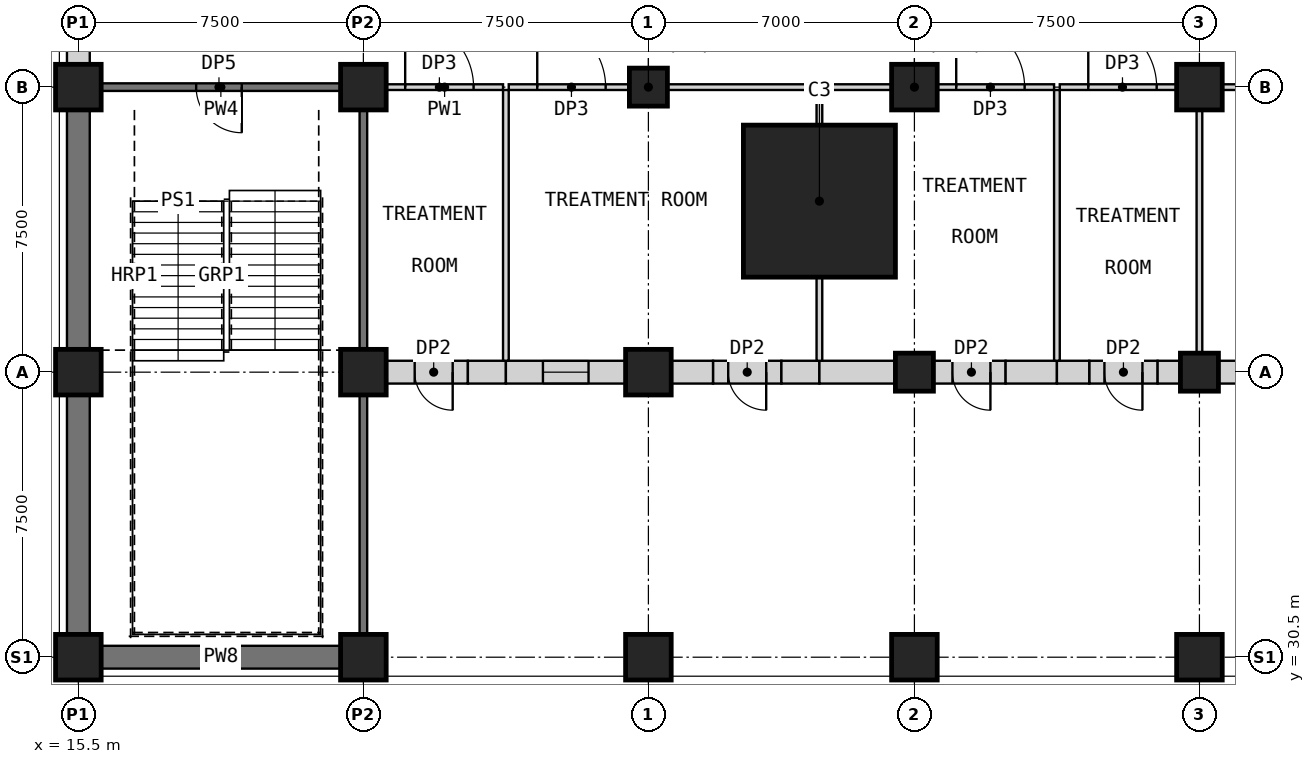
"""IFC4 building model, lengths in metres.
Left out: names, types, materials, properties, quantities, classifications, styles, units other than length and angle.
Written with IfcOpenShell. Run it as: python <this file> out.ifc"""

import sys

from ifc_helpers import new_model, si_unit, direction, frame, frame_2d, origin, origin_2d, place, context, subcontext, project, spatial, rectangle, extrude, element, fill, save


model = new_model("IFC4")
c1 = context("Model", 3, precision=1e-05, world=origin(), true_north=direction((0.0, 1.0)))
c2 = subcontext(c1, "Body", "Model", "MODEL_VIEW")
j1 = project(units=[si_unit("LENGTHUNIT", "METRE"), si_unit("PLANEANGLEUNIT", "RADIAN")], contexts=[c1])
p1 = place(None, origin())
s1 = spatial("IfcSite", under=j1, at=p1, CompositionType="ELEMENT")
p2 = place(p1, origin())
s2 = spatial("IfcBuilding", under=s1, at=p2, CompositionType="ELEMENT")
p3 = place(p2, frame((0.0, 0.0, 29.0)))
s3 = spatial("IfcBuildingStorey", under=s2, at=p3, CompositionType="ELEMENT", Elevation=29.0)
for number, where, z_axis, x_axis in (
    (1, (30.5, 45.5, 0.0), (0.0, 0.0, 1.0), (1.0, 0.0, 0.0)),
    (2, (37.5, 38.0, 0.0), (0.0, 0.0, 1.0), (1.0, 0.0, 0.0)),
):
    element("IfcColumn", number, at=place(p3, frame(where, z_axis=z_axis, x_axis=x_axis)), inside=s3, PredefinedType="COLUMN", context=c2, shape_type="SweptSolid", body=[
        extrude(rectangle(XDim=1.0, YDim=1.0, at=origin_2d()), origin(), (0.0, 0.0, 1.0), 5.0),
    ])
p4 = place(p3, frame((37.5, 45.5, 0.0), z_axis=(0.0, 0.0, 1.0), x_axis=(1.0, 0.0, 0.0)))
e3 = element("IfcColumn", 3, at=p4, inside=s3, PredefinedType="COLUMN", context=c2, shape_type="SweptSolid", body=[
    extrude(rectangle(XDim=1.2, YDim=1.2, at=origin_2d()), origin(), (0.0, 0.0, 1.0), 5.0),
])
p5 = place(p3, frame((45.0, 38.0, 0.0), z_axis=(0.0, 0.0, 1.0), x_axis=(1.0, 0.0, 0.0)))
e4 = element("IfcColumn", 4, at=p5, inside=s3, PredefinedType="COLUMN", context=c2, shape_type="SweptSolid", body=[
    extrude(rectangle(XDim=1.0, YDim=1.0, at=origin_2d()), origin(), (0.0, 0.0, 1.0), 5.0),
])
p6 = place(p3, frame((45.0, 45.5, 0.0), z_axis=(0.0, 0.0, 1.0), x_axis=(1.0, 0.0, 0.0)))
e5 = element("IfcColumn", 5, at=p6, inside=s3, PredefinedType="COLUMN", context=c2, shape_type="SweptSolid", body=[
    extrude(rectangle(XDim=1.2, YDim=1.2, at=origin_2d()), origin(), (0.0, 0.0, 1.0), 5.0),
])
p7 = place(p3, frame((35.0, 42.5, 0.0), z_axis=(0.0, 0.0, 1.0), x_axis=(1.0, 0.0, 0.0)))
e6 = element("IfcColumn", 6, at=p7, inside=s3, PredefinedType="COLUMN", context=c2, shape_type="SweptSolid", body=[
    extrude(rectangle(XDim=4.0, YDim=4.0, at=origin_2d()), origin(), (0.0, 0.0, 1.0), 5.0),
])
for number, where, z_axis, x_axis in (
    (7, (15.5, 30.5, 0.0), (0.0, 0.0, 1.0), (1.0, 0.0, 0.0)),
    (8, (15.5, 38.0, 0.0), (0.0, 0.0, 1.0), (1.0, 0.0, 0.0)),
    (9, (15.5, 45.5, 0.0), (0.0, 0.0, 1.0), (1.0, 0.0, 0.0)),
    (10, (23.0, 30.5, 0.0), (0.0, 0.0, 1.0), (1.0, 0.0, 0.0)),
    (11, (23.0, 38.0, 0.0), (0.0, 0.0, 1.0), (1.0, 0.0, 0.0)),
    (12, (23.0, 45.5, 0.0), (0.0, 0.0, 1.0), (1.0, 0.0, 0.0)),
    (13, (30.5, 30.5, 0.0), (0.0, 0.0, 1.0), (1.0, 0.0, 0.0)),
    (14, (30.5, 38.0, 0.0), (0.0, 0.0, 1.0), (1.0, 0.0, 0.0)),
    (15, (37.5, 30.5, 0.0), (0.0, 0.0, 1.0), (1.0, 0.0, 0.0)),
    (16, (45.0, 30.5, 0.0), (0.0, 0.0, 1.0), (1.0, 0.0, 0.0)),
):
    element("IfcColumn", number, at=place(p3, frame(where, z_axis=z_axis, x_axis=x_axis)), inside=s3, PredefinedType="COLUMN", context=c2, shape_type="SweptSolid", body=[
        extrude(rectangle(XDim=1.2, YDim=1.2, at=origin_2d()), origin(), (0.0, 0.0, 1.0), 5.0),
    ])
p8 = place(p3, frame((16.1, 30.5, 0.0), z_axis=(0.0, 0.0, 1.0), x_axis=(1.0, 0.0, 0.0)))
e17 = element("IfcWall", 17, at=p8, inside=s3, PredefinedType="PARTITIONING", context=c2, shape_type="SweptSolid", body=[
    extrude(rectangle(XDim=6.3, YDim=0.6, at=frame_2d((3.15, 0.0))), origin(), (0.0, 0.0, 1.0), 4.7),
])
p9 = place(p3, frame((22.4, 45.5, 0.0), z_axis=(0.0, 0.0, 1.0), x_axis=(-1.0, 0.0, 0.0)))
e18 = element("IfcWall", 18, at=p9, inside=s3, PredefinedType="SHEAR", context=c2, shape_type="SweptSolid", body=[
    extrude(rectangle(XDim=6.3, YDim=0.2, at=frame_2d((3.15, 0.0))), origin(), (0.0, 0.0, 1.0), 4.7),
])
p10 = place(p9, frame((2.6, 0.0, 0.0)))
e19 = element("IfcOpeningElement", 19, at=p10, cuts=e18, PredefinedType="OPENING", context=c2, shape_type="SweptSolid", body=[
    extrude(rectangle(XDim=1.2, YDim=2.1, at=frame_2d((0.6, 1.05))), frame((0.0, 0.11, 0.0), z_axis=(0.0, -1.0, 0.0), x_axis=(1.0, 0.0, 0.0)), (0.0, 0.0, 1.0), 0.22),
])
p11 = place(p3, frame((23.6, 45.5, 0.0), z_axis=(0.0, 0.0, 1.0), x_axis=(1.0, 0.0, 0.0)))
e20 = element("IfcWall", 20, at=p11, inside=s3, PredefinedType="PARTITIONING", context=c2, shape_type="SweptSolid", body=[
    extrude(rectangle(XDim=3.075, YDim=0.15, at=frame_2d((1.538, 0.0))), origin(), (0.0, 0.0, 1.0), 4.7),
])
p12 = place(p11, frame((0.5, 0.0, 0.0)))
e21 = element("IfcOpeningElement", 21, at=p12, cuts=e20, PredefinedType="OPENING", context=c2, shape_type="SweptSolid", body=[
    extrude(rectangle(XDim=1.8, YDim=2.4, at=frame_2d((0.9, 1.2))), frame((0.0, 0.085, 0.0), z_axis=(0.0, -1.0, 0.0), x_axis=(1.0, 0.0, 0.0)), (0.0, 0.0, 1.0), 0.17),
])
p13 = place(p3, frame((26.825, 45.5, 0.0), z_axis=(0.0, 0.0, 1.0), x_axis=(1.0, 0.0, 0.0)))
e22 = element("IfcWall", 22, at=p13, inside=s3, PredefinedType="PARTITIONING", context=c2, shape_type="SweptSolid", body=[
    extrude(rectangle(XDim=3.175, YDim=0.15, at=frame_2d((1.587, 0.0))), origin(), (0.0, 0.0, 1.0), 4.7),
])
p14 = place(p13, frame((0.75, 0.0, 0.0)))
e23 = element("IfcOpeningElement", 23, at=p14, cuts=e22, PredefinedType="OPENING", context=c2, shape_type="SweptSolid", body=[
    extrude(rectangle(XDim=1.8, YDim=2.4, at=frame_2d((0.9, 1.2))), frame((0.0, 0.085, 0.0), z_axis=(0.0, -1.0, 0.0), x_axis=(1.0, 0.0, 0.0)), (0.0, 0.0, 1.0), 0.17),
])
p15 = place(p3, frame((31.0, 45.5, 0.0), z_axis=(0.0, 0.0, 1.0), x_axis=(1.0, 0.0, 0.0)))
e24 = element("IfcWall", 24, at=p15, inside=s3, PredefinedType="PARTITIONING", context=c2, shape_type="SweptSolid", body=[
    extrude(rectangle(XDim=3.925, YDim=0.15, at=frame_2d((1.962, 0.0))), origin(), (0.0, 0.0, 1.0), 4.7),
])
p16 = place(p3, frame((35.075, 45.5, 0.0), z_axis=(0.0, 0.0, 1.0), x_axis=(1.0, 0.0, 0.0)))
e25 = element("IfcWall", 25, at=p16, inside=s3, PredefinedType="PARTITIONING", context=c2, shape_type="SweptSolid", body=[
    extrude(rectangle(XDim=1.825, YDim=0.15, at=frame_2d((0.913, 0.0))), origin(), (0.0, 0.0, 1.0), 4.7),
])
p17 = place(p3, frame((38.1, 45.5, 0.0), z_axis=(0.0, 0.0, 1.0), x_axis=(1.0, 0.0, 0.0)))
e26 = element("IfcWall", 26, at=p17, inside=s3, PredefinedType="PARTITIONING", context=c2, shape_type="SweptSolid", body=[
    extrude(rectangle(XDim=3.075, YDim=0.15, at=frame_2d((1.538, 0.0))), origin(), (0.0, 0.0, 1.0), 4.7),
])
p18 = place(p17, frame((0.5, 0.0, 0.0)))
e27 = element("IfcOpeningElement", 27, at=p18, cuts=e26, PredefinedType="OPENING", context=c2, shape_type="SweptSolid", body=[
    extrude(rectangle(XDim=1.8, YDim=2.4, at=frame_2d((0.9, 1.2))), frame((0.0, 0.085, 0.0), z_axis=(0.0, -1.0, 0.0), x_axis=(1.0, 0.0, 0.0)), (0.0, 0.0, 1.0), 0.17),
])
p19 = place(p3, frame((41.325, 45.5, 0.0), z_axis=(0.0, 0.0, 1.0), x_axis=(1.0, 0.0, 0.0)))
e28 = element("IfcWall", 28, at=p19, inside=s3, PredefinedType="PARTITIONING", context=c2, shape_type="SweptSolid", body=[
    extrude(rectangle(XDim=3.075, YDim=0.15, at=frame_2d((1.538, 0.0))), origin(), (0.0, 0.0, 1.0), 4.7),
])
p20 = place(p19, frame((0.75, 0.0, 0.0)))
e29 = element("IfcOpeningElement", 29, at=p20, cuts=e28, PredefinedType="OPENING", context=c2, shape_type="SweptSolid", body=[
    extrude(rectangle(XDim=1.8, YDim=2.4, at=frame_2d((0.9, 1.2))), frame((0.0, 0.085, 0.0), z_axis=(0.0, -1.0, 0.0), x_axis=(1.0, 0.0, 0.0)), (0.0, 0.0, 1.0), 0.17),
])
p21 = place(p3, frame((45.6, 45.5, 0.0), z_axis=(0.0, 0.0, 1.0), x_axis=(1.0, 0.0, 0.0)))
e30 = element("IfcWall", 30, at=p21, inside=s3, PredefinedType="PARTITIONING", context=c2, shape_type="SweptSolid", body=[
    extrude(rectangle(XDim=6.3, YDim=0.15, at=frame_2d((3.15, 0.0))), origin(), (0.0, 0.0, 1.0), 4.7),
])
p22 = place(p21, frame((2.25, 0.0, 0.0)))
e31 = element("IfcOpeningElement", 31, at=p22, cuts=e30, PredefinedType="OPENING", context=c2, shape_type="SweptSolid", body=[
    extrude(rectangle(XDim=1.8, YDim=2.4, at=frame_2d((0.9, 1.2))), frame((0.0, 0.085, 0.0), z_axis=(0.0, -1.0, 0.0), x_axis=(1.0, 0.0, 0.0)), (0.0, 0.0, 1.0), 0.17),
])
p23 = place(p3, frame((25.75, 38.0, 0.0), z_axis=(0.0, 0.0, 1.0), x_axis=(-1.0, 0.0, 0.0)))
e32 = element("IfcWall", 32, at=p23, inside=s3, PredefinedType="PARTITIONING", context=c2, shape_type="SweptSolid", body=[
    extrude(rectangle(XDim=2.15, YDim=0.6, at=frame_2d((1.075, 0.0))), origin(), (0.0, 0.0, 1.0), 4.7),
])
p24 = place(p23, frame((0.4, 0.0, 0.0)))
e33 = element("IfcOpeningElement", 33, at=p24, cuts=e32, PredefinedType="OPENING", context=c2, shape_type="SweptSolid", body=[
    extrude(rectangle(XDim=1.0, YDim=2.1, at=frame_2d((0.5, 1.05))), frame((0.0, 0.31, 0.0), z_axis=(0.0, -1.0, 0.0), x_axis=(1.0, 0.0, 0.0)), (0.0, 0.0, 1.0), 0.62),
])
p25 = place(p3, frame((25.75, 38.0, 0.0), z_axis=(0.0, 0.0, 1.0), x_axis=(1.0, 0.0, 0.0)))
e34 = element("IfcWall", 34, at=p25, inside=s3, PredefinedType="PARTITIONING", context=c2, shape_type="SweptSolid", body=[
    extrude(rectangle(XDim=1.0, YDim=0.6, at=frame_2d((0.5, 0.0))), origin(), (0.0, 0.0, 1.0), 4.7),
])
p26 = place(p3, frame((26.75, 38.0, 0.0), z_axis=(0.0, 0.0, 1.0), x_axis=(1.0, 0.0, 0.0)))
e35 = element("IfcWall", 35, at=p26, inside=s3, PredefinedType="PARTITIONING", context=c2, shape_type="SweptSolid", body=[
    extrude(rectangle(XDim=3.15, YDim=0.6, at=frame_2d((1.575, 0.0))), origin(), (0.0, 0.0, 1.0), 4.7),
])
p27 = place(p26, frame((0.975, 0.0, 0.9)))
e36 = element("IfcOpeningElement", 36, at=p27, cuts=e35, PredefinedType="OPENING", context=c2, shape_type="SweptSolid", body=[
    extrude(rectangle(XDim=1.2, YDim=2.8, at=frame_2d((0.6, 1.4))), frame((0.0, 0.31, 0.0), z_axis=(0.0, -1.0, 0.0), x_axis=(1.0, 0.0, 0.0)), (0.0, 0.0, 1.0), 0.62),
])
p28 = place(p3, frame((34.0, 38.0, 0.0), z_axis=(0.0, 0.0, 1.0), x_axis=(-1.0, 0.0, 0.0)))
e37 = element("IfcWall", 37, at=p28, inside=s3, PredefinedType="PARTITIONING", context=c2, shape_type="SweptSolid", body=[
    extrude(rectangle(XDim=1.8, YDim=0.6, at=frame_2d((0.9, 0.0))), origin(), (0.0, 0.0, 1.0), 4.7),
])
p29 = place(p28, frame((0.4, 0.0, 0.0)))
e38 = element("IfcOpeningElement", 38, at=p29, cuts=e37, PredefinedType="OPENING", context=c2, shape_type="SweptSolid", body=[
    extrude(rectangle(XDim=1.0, YDim=2.1, at=frame_2d((0.5, 1.05))), frame((0.0, 0.31, 0.0), z_axis=(0.0, -1.0, 0.0), x_axis=(1.0, 0.0, 0.0)), (0.0, 0.0, 1.0), 0.62),
])
p30 = place(p3, frame((31.1, 38.0, 0.0), z_axis=(0.0, 0.0, 1.0), x_axis=(1.0, 0.0, 0.0)))
e39 = element("IfcWall", 39, at=p30, inside=s3, PredefinedType="PARTITIONING", context=c2, shape_type="SweptSolid", body=[
    extrude(rectangle(XDim=1.1, YDim=0.6, at=frame_2d((0.55, 0.0))), origin(), (0.0, 0.0, 1.0), 4.7),
])
p31 = place(p3, frame((34.0, 38.0, 0.0), z_axis=(0.0, 0.0, 1.0), x_axis=(1.0, 0.0, 0.0)))
e40 = element("IfcWall", 40, at=p31, inside=s3, PredefinedType="PARTITIONING", context=c2, shape_type="SweptSolid", body=[
    extrude(rectangle(XDim=1.0, YDim=0.6, at=frame_2d((0.5, 0.0))), origin(), (0.0, 0.0, 1.0), 4.7),
])
p32 = place(p3, frame((35.0, 38.0, 0.0), z_axis=(0.0, 0.0, 1.0), x_axis=(1.0, 0.0, 0.0)))
e41 = element("IfcWall", 41, at=p32, inside=s3, PredefinedType="PARTITIONING", context=c2, shape_type="SweptSolid", body=[
    extrude(rectangle(XDim=2.0, YDim=0.6, at=frame_2d((1.0, 0.0))), origin(), (0.0, 0.0, 1.0), 4.7),
])
p33 = place(p3, frame((39.9, 38.0, 0.0), z_axis=(0.0, 0.0, 1.0), x_axis=(-1.0, 0.0, 0.0)))
e42 = element("IfcWall", 42, at=p33, inside=s3, PredefinedType="PARTITIONING", context=c2, shape_type="SweptSolid", body=[
    extrude(rectangle(XDim=1.9, YDim=0.6, at=frame_2d((0.95, 0.0))), origin(), (0.0, 0.0, 1.0), 4.25),
])
p34 = place(p33, frame((0.4, 0.0, 0.0)))
e43 = element("IfcOpeningElement", 43, at=p34, cuts=e42, PredefinedType="OPENING", context=c2, shape_type="SweptSolid", body=[
    extrude(rectangle(XDim=1.0, YDim=2.1, at=frame_2d((0.5, 1.05))), frame((0.0, 0.31, 0.0), z_axis=(0.0, -1.0, 0.0), x_axis=(1.0, 0.0, 0.0)), (0.0, 0.0, 1.0), 0.62),
])
p35 = place(p3, frame((39.9, 38.0, 0.0), z_axis=(0.0, 0.0, 1.0), x_axis=(1.0, 0.0, 0.0)))
e44 = element("IfcWall", 44, at=p35, inside=s3, PredefinedType="PARTITIONING", context=c2, shape_type="SweptSolid", body=[
    extrude(rectangle(XDim=1.35, YDim=0.6, at=frame_2d((0.675, 0.0))), origin(), (0.0, 0.0, 1.0), 4.25),
])
p36 = place(p3, frame((43.9, 38.0, 0.0), z_axis=(0.0, 0.0, 1.0), x_axis=(-1.0, 0.0, 0.0)))
e45 = element("IfcWall", 45, at=p36, inside=s3, PredefinedType="PARTITIONING", context=c2, shape_type="SweptSolid", body=[
    extrude(rectangle(XDim=1.8, YDim=0.6, at=frame_2d((0.9, 0.0))), origin(), (0.0, 0.0, 1.0), 4.25),
])
p37 = place(p36, frame((0.4, 0.0, 0.0)))
e46 = element("IfcOpeningElement", 46, at=p37, cuts=e45, PredefinedType="OPENING", context=c2, shape_type="SweptSolid", body=[
    extrude(rectangle(XDim=1.0, YDim=2.1, at=frame_2d((0.5, 1.05))), frame((0.0, 0.31, 0.0), z_axis=(0.0, -1.0, 0.0), x_axis=(1.0, 0.0, 0.0)), (0.0, 0.0, 1.0), 0.62),
])
p38 = place(p3, frame((41.25, 38.0, 0.0), z_axis=(0.0, 0.0, 1.0), x_axis=(1.0, 0.0, 0.0)))
e47 = element("IfcWall", 47, at=p38, inside=s3, PredefinedType="PARTITIONING", context=c2, shape_type="SweptSolid", body=[
    extrude(rectangle(XDim=0.85, YDim=0.6, at=frame_2d((0.425, 0.0))), origin(), (0.0, 0.0, 1.0), 4.25),
])
p39 = place(p3, frame((43.9, 38.0, 0.0), z_axis=(0.0, 0.0, 1.0), x_axis=(1.0, 0.0, 0.0)))
e48 = element("IfcWall", 48, at=p39, inside=s3, PredefinedType="PARTITIONING", context=c2, shape_type="SweptSolid", body=[
    extrude(rectangle(XDim=0.6, YDim=0.6, at=frame_2d((0.3, 0.0))), origin(), (0.0, 0.0, 1.0), 4.25),
])
p40 = place(p3, frame((45.5, 38.0, 0.0), z_axis=(0.0, 0.0, 1.0), x_axis=(1.0, 0.0, 0.0)))
e49 = element("IfcWall", 49, at=p40, inside=s3, PredefinedType="PARTITIONING", context=c2, shape_type="SweptSolid", body=[
    extrude(rectangle(XDim=2.35, YDim=0.6, at=frame_2d((1.175, 0.0))), origin(), (0.0, 0.0, 1.0), 4.25),
])
for number, where, z_axis, x_axis in (
    (50, (15.5, 31.1, 0.0), (0.0, 0.0, 1.0), (0.0, 1.0, 0.0)),
    (51, (15.5, 38.6, 0.0), (0.0, 0.0, 1.0), (0.0, 1.0, 0.0)),
):
    element("IfcWall", number, at=place(p3, frame(where, z_axis=z_axis, x_axis=x_axis)), inside=s3, PredefinedType="PARTITIONING", context=c2, shape_type="SweptSolid", body=[
        extrude(rectangle(XDim=6.3, YDim=0.6, at=frame_2d((3.15, 0.0))), origin(), (0.0, 0.0, 1.0), 4.7),
    ])
p41 = place(p3, frame((15.5, 46.1, 0.0), z_axis=(0.0, 0.0, 1.0), x_axis=(0.0, 1.0, 0.0)))
e52 = element("IfcWall", 52, at=p41, inside=s3, PredefinedType="PARTITIONING", context=c2, shape_type="SweptSolid", body=[
    extrude(rectangle(XDim=5.8, YDim=0.6, at=frame_2d((2.9, 0.0))), origin(), (0.0, 0.0, 1.0), 4.7),
])
p42 = place(p41, frame((0.816, 0.0, 0.9)))
e53 = element("IfcOpeningElement", 53, at=p42, cuts=e52, PredefinedType="OPENING", context=c2, shape_type="SweptSolid", body=[
    extrude(rectangle(XDim=1.5, YDim=2.8, at=frame_2d((0.75, 1.4))), frame((0.0, 0.31, 0.0), z_axis=(0.0, -1.0, 0.0), x_axis=(1.0, 0.0, 0.0)), (0.0, 0.0, 1.0), 0.62),
])
p43 = place(p41, frame((3.484, 0.0, 0.9)))
e54 = element("IfcOpeningElement", 54, at=p43, cuts=e52, PredefinedType="OPENING", context=c2, shape_type="SweptSolid", body=[
    extrude(rectangle(XDim=1.5, YDim=2.8, at=frame_2d((0.75, 1.4))), frame((0.0, 0.31, 0.0), z_axis=(0.0, -1.0, 0.0), x_axis=(1.0, 0.0, 0.0)), (0.0, 0.0, 1.0), 0.62),
])
for number, where, z_axis, x_axis in (
    (55, (23.0, 31.1, 0.0), (0.0, 0.0, 1.0), (0.0, 1.0, 0.0)),
    (56, (23.0, 38.6, 0.0), (0.0, 0.0, 1.0), (0.0, 1.0, 0.0)),
):
    element("IfcWall", number, at=place(p3, frame(where, z_axis=z_axis, x_axis=x_axis)), inside=s3, PredefinedType="SHEAR", context=c2, shape_type="SweptSolid", body=[
        extrude(rectangle(XDim=6.3, YDim=0.2, at=frame_2d((3.15, 0.0))), origin(), (0.0, 0.0, 1.0), 4.7),
    ])
p44 = place(p3, frame((26.75, 38.3, 0.0), z_axis=(0.0, 0.0, 1.0), x_axis=(0.0, 1.0, 0.0)))
e57 = element("IfcWall", 57, at=p44, inside=s3, PredefinedType="PARTITIONING", context=c2, shape_type="SweptSolid", body=[
    extrude(rectangle(XDim=7.125, YDim=0.15, at=frame_2d((3.562, 0.0))), origin(), (0.0, 0.0, 1.0), 4.7),
])
p45 = place(p3, frame((35.0, 38.3, 0.0), z_axis=(0.0, 0.0, 1.0), x_axis=(0.0, 1.0, 0.0)))
e58 = element("IfcWall", 58, at=p45, inside=s3, PredefinedType="PARTITIONING", context=c2, shape_type="SweptSolid", body=[
    extrude(rectangle(XDim=2.2, YDim=0.15, at=frame_2d((1.1, 0.0))), origin(), (0.0, 0.0, 1.0), 4.7),
])
p46 = place(p3, frame((35.0, 44.5, 0.0), z_axis=(0.0, 0.0, 1.0), x_axis=(0.0, 1.0, 0.0)))
e59 = element("IfcWall", 59, at=p46, inside=s3, PredefinedType="PARTITIONING", context=c2, shape_type="SweptSolid", body=[
    extrude(rectangle(XDim=0.925, YDim=0.15, at=frame_2d((0.462, 0.0))), origin(), (0.0, 0.0, 1.0), 4.7),
])
p47 = place(p3, frame((41.25, 38.3, 0.0), z_axis=(0.0, 0.0, 1.0), x_axis=(0.0, 1.0, 0.0)))
e60 = element("IfcWall", 60, at=p47, inside=s3, PredefinedType="PARTITIONING", context=c2, shape_type="SweptSolid", body=[
    extrude(rectangle(XDim=7.125, YDim=0.15, at=frame_2d((3.562, 0.0))), origin(), (0.0, 0.0, 1.0), 4.7),
])
p48 = place(p3, frame((45.0, 38.5, 0.0), z_axis=(0.0, 0.0, 1.0), x_axis=(0.0, 1.0, 0.0)))
e61 = element("IfcWall", 61, at=p48, inside=s3, PredefinedType="PARTITIONING", context=c2, shape_type="SweptSolid", body=[
    extrude(rectangle(XDim=6.4, YDim=0.15, at=frame_2d((3.2, 0.0))), origin(), (0.0, 0.0, 1.0), 4.7),
])
p49 = place(p10, origin())
e62 = element("IfcDoor", 62, at=p49, inside=s3, OperationType="SINGLE_SWING_LEFT", PredefinedType="DOOR", context=c2, shape_type="SweptSolid", body=[
    extrude(rectangle(XDim=1.2, YDim=2.1, at=frame_2d((0.6, 1.05))), frame((0.0, 0.025, 0.0), z_axis=(0.0, -1.0, 0.0), x_axis=(1.0, 0.0, 0.0)), (0.0, 0.0, 1.0), 0.05),
])
fill(e19, e62)
p50 = place(p12, origin())
e63 = element("IfcDoor", 63, at=p50, inside=s3, OperationType="SINGLE_SWING_LEFT", PredefinedType="DOOR", context=c2, shape_type="SweptSolid", body=[
    extrude(rectangle(XDim=1.8, YDim=2.4, at=frame_2d((0.9, 1.2))), frame((0.0, 0.025, 0.0), z_axis=(0.0, -1.0, 0.0), x_axis=(1.0, 0.0, 0.0)), (0.0, 0.0, 1.0), 0.05),
])
fill(e21, e63)
p51 = place(p14, origin())
e64 = element("IfcDoor", 64, at=p51, inside=s3, OperationType="SINGLE_SWING_LEFT", PredefinedType="DOOR", context=c2, shape_type="SweptSolid", body=[
    extrude(rectangle(XDim=1.8, YDim=2.4, at=frame_2d((0.9, 1.2))), frame((0.0, 0.025, 0.0), z_axis=(0.0, -1.0, 0.0), x_axis=(1.0, 0.0, 0.0)), (0.0, 0.0, 1.0), 0.05),
])
fill(e23, e64)
p52 = place(p18, origin())
e65 = element("IfcDoor", 65, at=p52, inside=s3, OperationType="SINGLE_SWING_LEFT", PredefinedType="DOOR", context=c2, shape_type="SweptSolid", body=[
    extrude(rectangle(XDim=1.8, YDim=2.4, at=frame_2d((0.9, 1.2))), frame((0.0, 0.025, 0.0), z_axis=(0.0, -1.0, 0.0), x_axis=(1.0, 0.0, 0.0)), (0.0, 0.0, 1.0), 0.05),
])
fill(e27, e65)
p53 = place(p20, origin())
e66 = element("IfcDoor", 66, at=p53, inside=s3, OperationType="SINGLE_SWING_LEFT", PredefinedType="DOOR", context=c2, shape_type="SweptSolid", body=[
    extrude(rectangle(XDim=1.8, YDim=2.4, at=frame_2d((0.9, 1.2))), frame((0.0, 0.025, 0.0), z_axis=(0.0, -1.0, 0.0), x_axis=(1.0, 0.0, 0.0)), (0.0, 0.0, 1.0), 0.05),
])
fill(e29, e66)
p54 = place(p24, origin())
e67 = element("IfcDoor", 67, at=p54, inside=s3, OperationType="SINGLE_SWING_LEFT", PredefinedType="DOOR", context=c2, shape_type="SweptSolid", body=[
    extrude(rectangle(XDim=1.0, YDim=2.1, at=frame_2d((0.5, 1.05))), frame((0.0, 0.025, 0.0), z_axis=(0.0, -1.0, 0.0), x_axis=(1.0, 0.0, 0.0)), (0.0, 0.0, 1.0), 0.05),
])
fill(e33, e67)
p55 = place(p27, origin())
e68 = element("IfcWindow", 68, at=p55, inside=s3, PartitioningType="SINGLE_PANEL", PredefinedType="WINDOW", context=c2, shape_type="SweptSolid", body=[
    extrude(rectangle(XDim=1.2, YDim=2.8, at=frame_2d((0.6, 1.4))), frame((0.0, 0.03, 0.0), z_axis=(0.0, -1.0, 0.0), x_axis=(1.0, 0.0, 0.0)), (0.0, 0.0, 1.0), 0.06),
])
fill(e36, e68)
p56 = place(p29, origin())
e69 = element("IfcDoor", 69, at=p56, inside=s3, OperationType="SINGLE_SWING_LEFT", PredefinedType="DOOR", context=c2, shape_type="SweptSolid", body=[
    extrude(rectangle(XDim=1.0, YDim=2.1, at=frame_2d((0.5, 1.05))), frame((0.0, 0.025, 0.0), z_axis=(0.0, -1.0, 0.0), x_axis=(1.0, 0.0, 0.0)), (0.0, 0.0, 1.0), 0.05),
])
fill(e38, e69)
p57 = place(p34, origin())
e70 = element("IfcDoor", 70, at=p57, inside=s3, OperationType="SINGLE_SWING_LEFT", PredefinedType="DOOR", context=c2, shape_type="SweptSolid", body=[
    extrude(rectangle(XDim=1.0, YDim=2.1, at=frame_2d((0.5, 1.05))), frame((0.0, 0.025, 0.0), z_axis=(0.0, -1.0, 0.0), x_axis=(1.0, 0.0, 0.0)), (0.0, 0.0, 1.0), 0.05),
])
fill(e43, e70)
p58 = place(p37, origin())
e71 = element("IfcDoor", 71, at=p58, inside=s3, OperationType="SINGLE_SWING_LEFT", PredefinedType="DOOR", context=c2, shape_type="SweptSolid", body=[
    extrude(rectangle(XDim=1.0, YDim=2.1, at=frame_2d((0.5, 1.05))), frame((0.0, 0.025, 0.0), z_axis=(0.0, -1.0, 0.0), x_axis=(1.0, 0.0, 0.0)), (0.0, 0.0, 1.0), 0.05),
])
fill(e46, e71)
save(model, sys.argv[1])
